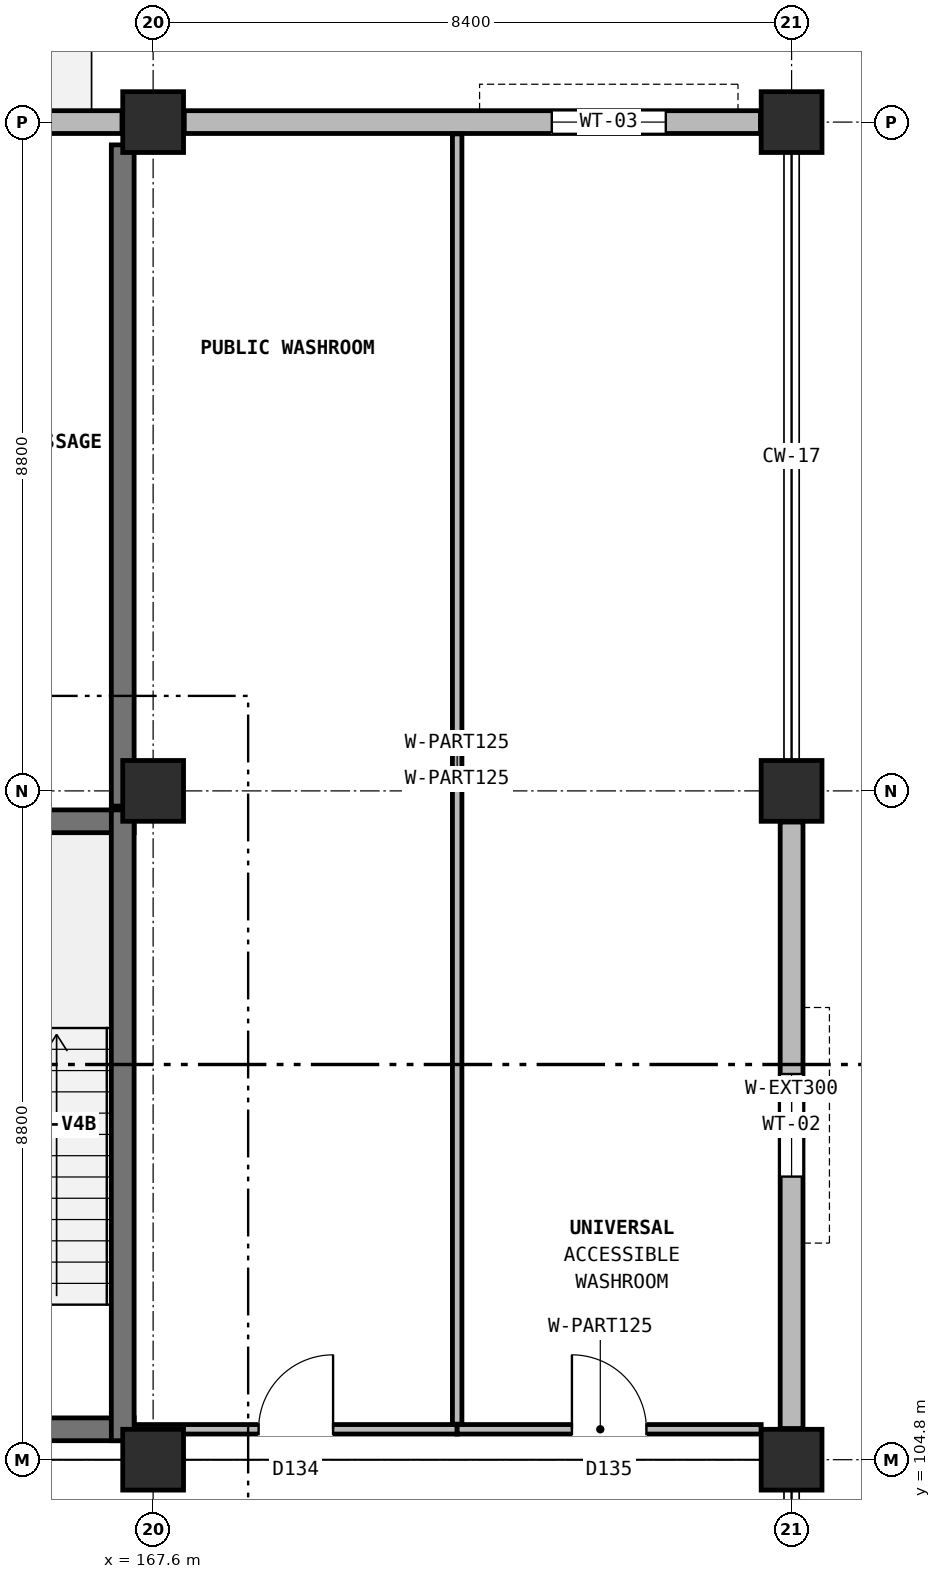
"""IFC4 building model, lengths in metres.
Left out: names, types, materials, properties, quantities, classifications, styles, units other than length and angle.
Written with IfcOpenShell. Run it as: python <this file> out.ifc"""

import sys

from ifc_helpers import new_model, si_unit, direction, frame, frame_2d, origin, origin_2d, place, context, subcontext, project, spatial, rectangle, extrude, element, fill, save


model = new_model("IFC4")
c1 = context("Model", 3, precision=1e-05, world=origin(), true_north=direction((0.0, 1.0)))
c2 = subcontext(c1, "Body", "Model", "MODEL_VIEW")
j1 = project(units=[si_unit("LENGTHUNIT", "METRE"), si_unit("PLANEANGLEUNIT", "RADIAN")], contexts=[c1])
p1 = place(None, origin())
s1 = spatial("IfcSite", under=j1, at=p1, CompositionType="ELEMENT")
p2 = place(p1, origin())
s2 = spatial("IfcBuilding", under=s1, at=p2, CompositionType="ELEMENT")
p3 = place(p2, origin())
s3 = spatial("IfcBuildingStorey", under=s2, at=p3, CompositionType="ELEMENT", Elevation=0.0)
for number, where, z_axis, x_axis in (
    (1, (167.6, 104.8, 0.0), (0.0, 0.0, 1.0), (1.0, 0.0, 0.0)),
    (2, (167.6, 113.6, 0.0), (0.0, 0.0, 1.0), (1.0, 0.0, 0.0)),
    (3, (167.6, 122.4, 0.0), (0.0, 0.0, 1.0), (1.0, 0.0, 0.0)),
    (4, (176.0, 104.8, 0.0), (0.0, 0.0, 1.0), (1.0, 0.0, 0.0)),
    (5, (176.0, 113.6, 0.0), (0.0, 0.0, 1.0), (1.0, 0.0, 0.0)),
    (6, (176.0, 122.4, 0.0), (0.0, 0.0, 1.0), (1.0, 0.0, 0.0)),
):
    element("IfcColumn", number, at=place(p3, frame(where, z_axis=z_axis, x_axis=x_axis)), inside=s3, PredefinedType="COLUMN", context=c2, shape_type="SweptSolid", body=[
        extrude(rectangle(XDim=0.8, YDim=0.8, at=origin_2d()), origin(), (0.0, 0.0, 1.0), 4.8),
    ])
p4 = place(p3, frame((176.0, 105.21, 0.0), z_axis=(0.0, 0.0, 1.0), x_axis=(0.0, 1.0, 0.0)))
e7 = element("IfcWall", 7, at=p4, inside=s3, PredefinedType="SOLIDWALL", context=c2, shape_type="SweptSolid", body=[
    extrude(rectangle(XDim=7.98, YDim=0.3, at=frame_2d((3.99, 0.0))), origin(), (0.0, 0.0, 1.0), 4.05),
])
p5 = place(p4, frame((3.315, 0.0, 0.9)))
e8 = element("IfcOpeningElement", 8, at=p5, cuts=e7, PredefinedType="OPENING", context=c2, shape_type="SweptSolid", body=[
    extrude(rectangle(XDim=1.35, YDim=1.8, at=frame_2d((0.675, 0.9))), frame((0.0, 0.16, 0.0), z_axis=(0.0, -1.0, 0.0), x_axis=(1.0, 0.0, 0.0)), (0.0, 0.0, 1.0), 0.32),
])
p6 = place(p3, frame((175.59, 122.4, 0.0), z_axis=(0.0, 0.0, 1.0), x_axis=(-1.0, 0.0, 0.0)))
e9 = element("IfcWall", 9, at=p6, inside=s3, PredefinedType="SOLIDWALL", context=c2, shape_type="SweptSolid", body=[
    extrude(rectangle(XDim=7.58, YDim=0.3, at=frame_2d((3.79, 0.0))), origin(), (0.0, 0.0, 1.0), 4.05),
])
p7 = place(p6, frame((1.245, 0.0, 0.9)))
e10 = element("IfcOpeningElement", 10, at=p7, cuts=e9, PredefinedType="OPENING", context=c2, shape_type="SweptSolid", body=[
    extrude(rectangle(XDim=1.5, YDim=1.8, at=frame_2d((0.75, 0.9))), frame((0.0, 0.16, 0.0), z_axis=(0.0, -1.0, 0.0), x_axis=(1.0, 0.0, 0.0)), (0.0, 0.0, 1.0), 0.32),
])
p8 = place(p3, frame((167.19, 122.4, 0.0), z_axis=(0.0, 0.0, 1.0), x_axis=(-1.0, 0.0, 0.0)))
e11 = element("IfcWall", 11, at=p8, inside=s3, PredefinedType="SOLIDWALL", context=c2, shape_type="SweptSolid", body=[
    extrude(rectangle(XDim=7.58, YDim=0.3, at=frame_2d((3.79, 0.0))), origin(), (0.0, 0.0, 1.0), 4.05),
])
p9 = place(p8, frame((1.1, 0.0, 0.0)))
e12 = element("IfcOpeningElement", 12, at=p9, cuts=e11, PredefinedType="OPENING", context=c2, shape_type="SweptSolid", body=[
    extrude(rectangle(XDim=1.1, YDim=2.2, at=frame_2d((0.55, 1.1))), frame((0.0, 0.16, 0.0), z_axis=(0.0, -1.0, 0.0), x_axis=(1.0, 0.0, 0.0)), (0.0, 0.0, 1.0), 0.32),
])
p10 = place(p3, frame((163.75, 105.2, 0.0), z_axis=(0.0, 0.0, 1.0), x_axis=(1.0, 0.0, 0.0)))
e13 = element("IfcWall", 13, at=p10, inside=s3, PredefinedType="SHEAR", context=c2, shape_type="SweptSolid", body=[
    extrude(rectangle(XDim=3.6, YDim=0.3, at=frame_2d((1.8, 0.0))), origin(), (0.0, 0.0, 1.0), 4.8),
])
p11 = place(p10, frame((1.05, 0.0, 0.0)))
e14 = element("IfcOpeningElement", 14, at=p11, cuts=e13, PredefinedType="OPENING", context=c2, shape_type="SweptSolid", body=[
    extrude(rectangle(XDim=1.1, YDim=2.2, at=frame_2d((0.55, 1.1))), frame((0.0, 0.16, 0.0), z_axis=(0.0, -1.0, 0.0), x_axis=(1.0, 0.0, 0.0)), (0.0, 0.0, 1.0), 0.32),
])
p12 = place(p3, frame((163.75, 113.2, 0.0), z_axis=(0.0, 0.0, 1.0), x_axis=(1.0, 0.0, 0.0)))
e15 = element("IfcWall", 15, at=p12, inside=s3, PredefinedType="SHEAR", context=c2, shape_type="SweptSolid", body=[
    extrude(rectangle(XDim=3.6, YDim=0.3, at=frame_2d((1.8, 0.0))), origin(), (0.0, 0.0, 1.0), 4.8),
])
p13 = place(p3, frame((167.2, 105.05, 0.0), z_axis=(0.0, 0.0, 1.0), x_axis=(0.0, 1.0, 0.0)))
e16 = element("IfcWall", 16, at=p13, inside=s3, PredefinedType="SHEAR", context=c2, shape_type="SweptSolid", body=[
    extrude(rectangle(XDim=8.3, YDim=0.3, at=frame_2d((4.15, 0.0))), origin(), (0.0, 0.0, 1.0), 4.8),
])
p14 = place(p3, frame((167.2, 113.4, 0.0), z_axis=(0.0, 0.0, 1.0), x_axis=(0.0, 1.0, 0.0)))
e17 = element("IfcWall", 17, at=p14, inside=s3, PredefinedType="SHEAR", context=c2, shape_type="SweptSolid", body=[
    extrude(rectangle(XDim=8.7, YDim=0.3, at=frame_2d((4.35, 0.0))), origin(), (0.0, 0.0, 1.0), 4.48),
])
p15 = place(p3, frame((167.355, 105.2, 0.0), z_axis=(0.0, 0.0, 1.0), x_axis=(1.0, 0.0, 0.0)))
e18 = element("IfcWall", 18, at=p15, inside=s3, PredefinedType="PARTITIONING", context=c2, shape_type="SweptSolid", body=[
    extrude(rectangle(XDim=4.245, YDim=0.125, at=frame_2d((2.123, 0.0))), origin(), (0.0, 0.0, 1.0), 4.045),
])
p16 = place(p15, frame((1.633, 0.0, 0.0)))
e19 = element("IfcOpeningElement", 19, at=p16, cuts=e18, PredefinedType="OPENING", context=c2, shape_type="SweptSolid", body=[
    extrude(rectangle(XDim=0.98, YDim=2.1, at=frame_2d((0.49, 1.05))), frame((0.0, 0.073, 0.0), z_axis=(0.0, -1.0, 0.0), x_axis=(1.0, 0.0, 0.0)), (0.0, 0.0, 1.0), 0.145),
])
p17 = place(p3, frame((171.6, 105.2, 0.0), z_axis=(0.0, 0.0, 1.0), x_axis=(1.0, 0.0, 0.0)))
e20 = element("IfcWall", 20, at=p17, inside=s3, PredefinedType="PARTITIONING", context=c2, shape_type="SweptSolid", body=[
    extrude(rectangle(XDim=4.0, YDim=0.125, at=frame_2d((2.0, 0.0))), origin(), (0.0, 0.0, 1.0), 4.045),
])
p18 = place(p17, frame((1.51, 0.0, 0.0)))
e21 = element("IfcOpeningElement", 21, at=p18, cuts=e20, PredefinedType="OPENING", context=c2, shape_type="SweptSolid", body=[
    extrude(rectangle(XDim=0.98, YDim=2.1, at=frame_2d((0.49, 1.05))), frame((0.0, 0.073, 0.0), z_axis=(0.0, -1.0, 0.0), x_axis=(1.0, 0.0, 0.0)), (0.0, 0.0, 1.0), 0.145),
])
p19 = place(p3, frame((171.6, 105.268, 0.0), z_axis=(0.0, 0.0, 1.0), x_axis=(0.0, 1.0, 0.0)))
e22 = element("IfcWall", 22, at=p19, inside=s3, PredefinedType="PARTITIONING", context=c2, shape_type="SweptSolid", body=[
    extrude(rectangle(XDim=16.978, YDim=0.125, at=frame_2d((8.489, 0.0))), origin(), (0.0, 0.0, 1.0), 4.465),
])
p20 = place(p5, origin())
e23 = element("IfcWindow", 23, at=p20, inside=s3, PartitioningType="SINGLE_PANEL", PredefinedType="WINDOW", context=c2, shape_type="SweptSolid", body=[
    extrude(rectangle(XDim=1.35, YDim=1.8, at=frame_2d((0.675, 0.9))), frame((0.0, 0.03, 0.0), z_axis=(0.0, -1.0, 0.0), x_axis=(1.0, 0.0, 0.0)), (0.0, 0.0, 1.0), 0.06),
])
fill(e8, e23)
p21 = place(p7, origin())
e24 = element("IfcWindow", 24, at=p21, inside=s3, PartitioningType="SINGLE_PANEL", PredefinedType="WINDOW", context=c2, shape_type="SweptSolid", body=[
    extrude(rectangle(XDim=1.5, YDim=1.8, at=frame_2d((0.75, 0.9))), frame((0.0, 0.03, 0.0), z_axis=(0.0, -1.0, 0.0), x_axis=(1.0, 0.0, 0.0)), (0.0, 0.0, 1.0), 0.06),
])
fill(e10, e24)
p22 = place(p16, origin())
e25 = element("IfcDoor", 25, at=p22, inside=s3, OperationType="SINGLE_SWING_RIGHT", PredefinedType="DOOR", context=c2, shape_type="SweptSolid", body=[
    extrude(rectangle(XDim=0.98, YDim=2.1, at=frame_2d((0.49, 1.05))), frame((0.0, 0.025, 0.0), z_axis=(0.0, -1.0, 0.0), x_axis=(1.0, 0.0, 0.0)), (0.0, 0.0, 1.0), 0.05),
])
fill(e19, e25)
p23 = place(p18, origin())
e26 = element("IfcDoor", 26, at=p23, inside=s3, OperationType="SINGLE_SWING_LEFT", PredefinedType="DOOR", context=c2, shape_type="SweptSolid", body=[
    extrude(rectangle(XDim=0.98, YDim=2.1, at=frame_2d((0.49, 1.05))), frame((0.0, 0.025, 0.0), z_axis=(0.0, -1.0, 0.0), x_axis=(1.0, 0.0, 0.0)), (0.0, 0.0, 1.0), 0.05),
])
fill(e21, e26)
save(model, sys.argv[1])
